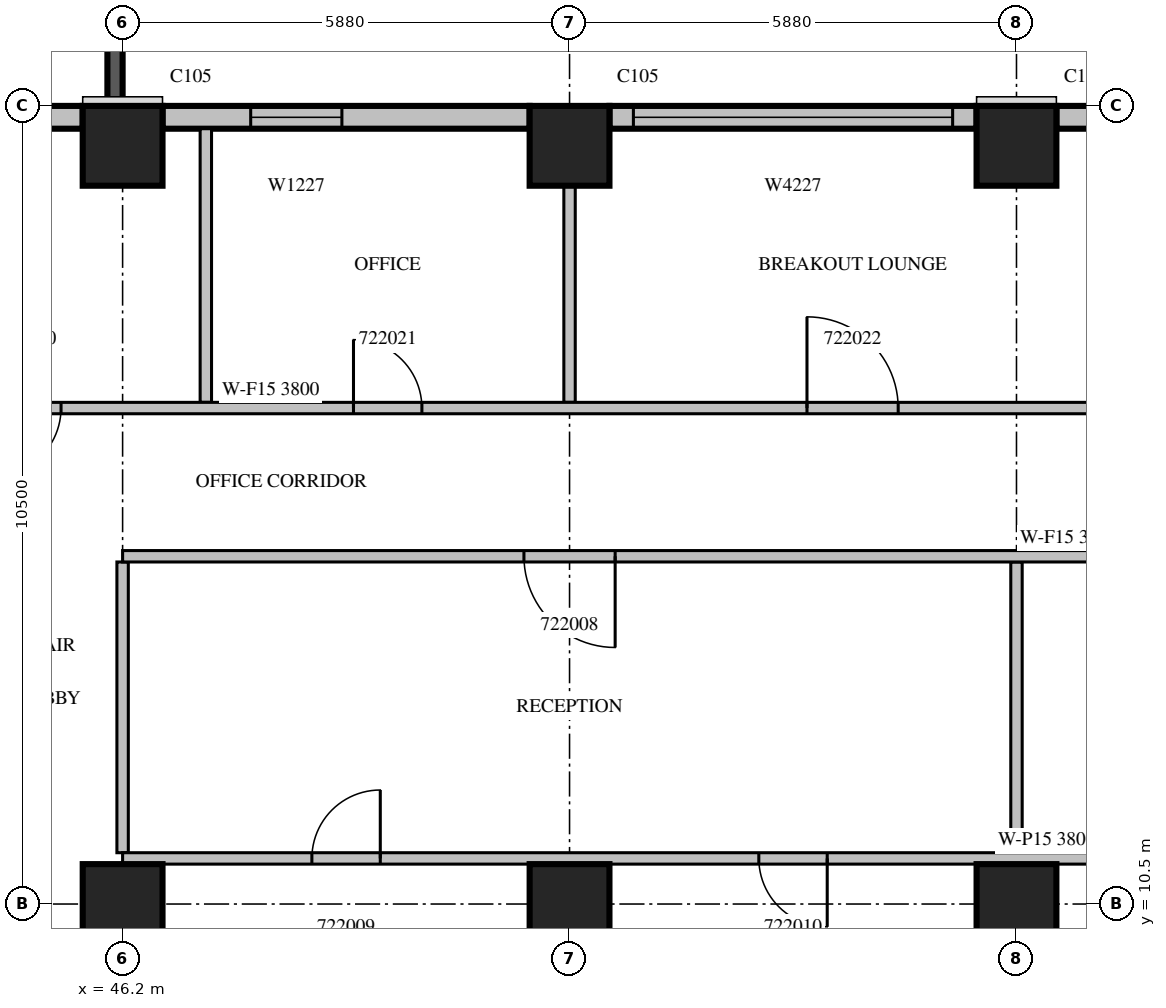
"""IFC4 building model, lengths in metres.
Left out: names, types, materials, properties, quantities, classifications, styles, units other than length and angle.
Written with IfcOpenShell. Run it as: python <this file> out.ifc"""

import sys

from ifc_helpers import new_model, si_unit, direction, frame, frame_2d, origin, origin_2d, place, context, subcontext, project, spatial, rectangle, extrude, source, transform, mapped, element, fill, save


model = new_model("IFC4")
c1 = context("Model", 3, precision=1e-05, world=origin(), true_north=direction((0.0, 1.0)))
c2 = subcontext(c1, "Body", "Model", "MODEL_VIEW")
j1 = project(units=[si_unit("LENGTHUNIT", "METRE"), si_unit("PLANEANGLEUNIT", "RADIAN")], contexts=[c1])
p1 = place(None, origin())
s1 = spatial("IfcSite", under=j1, at=p1, CompositionType="ELEMENT")
p2 = place(p1, origin())
s2 = spatial("IfcBuilding", under=s1, at=p2, CompositionType="ELEMENT")
p3 = place(p2, frame((0.0, 0.0, 103.5)))
s3 = spatial("IfcBuildingStorey", under=s2, at=p3, CompositionType="ELEMENT", Elevation=103.5)
m1 = source(origin(), c2, "Body", "SweptSolid", [
    extrude(rectangle(XDim=1.05, YDim=1.05, at=origin_2d()), origin(), (0.0, 0.0, 1.0), 4.2),
])
for number, where, z_axis, x_axis in (
    (1, (46.2, 10.5, 0.0), (0.0, 0.0, 1.0), (1.0, 0.0, 0.0)),
    (2, (52.08, 10.5, 0.0), (0.0, 0.0, 1.0), (1.0, 0.0, 0.0)),
    (3, (57.96, 10.5, 0.0), (0.0, 0.0, 1.0), (1.0, 0.0, 0.0)),
    (4, (46.2, 20.475, 0.0), (0.0, 0.0, 1.0), (1.0, 0.0, 0.0)),
    (5, (52.08, 20.475, 0.0), (0.0, 0.0, 1.0), (1.0, 0.0, 0.0)),
    (6, (57.96, 20.475, 0.0), (0.0, 0.0, 1.0), (1.0, 0.0, 0.0)),
):
    element("IfcColumn", number, at=place(p3, frame(where, z_axis=z_axis, x_axis=x_axis)), inside=s3, PredefinedType="COLUMN", context=c2, shape_type="MappedRepresentation", body=[
        mapped(m1, transform((0.0, 0.0, 0.0), scale=1.0)),
    ])
m2 = source(origin(), c2, "Body", "SweptSolid", [
    extrude(rectangle(XDim=4.83, YDim=0.3, at=frame_2d((2.415, 0.0))), origin(), (0.0, 0.0, 1.0), 3.8),
])
p4 = place(p3, frame((63.315, 20.85, 0.0), z_axis=(0.0, 0.0, 1.0), x_axis=(-1.0, 0.0, 0.0)))
e7 = element("IfcWall", 7, at=p4, inside=s3, PredefinedType="STANDARD", context=c2, shape_type="MappedRepresentation", body=[
    mapped(m2, transform((0.0, 0.0, 0.0), scale=1.0)),
])
m3 = source(origin(), c2, "Body", "SweptSolid", [
    extrude(rectangle(XDim=1.8, YDim=2.7, at=frame_2d((0.9, 1.35))), frame((0.0, 0.16, 0.0), z_axis=(0.0, -1.0, 0.0), x_axis=(1.0, 0.0, 0.0)), (0.0, 0.0, 1.0), 0.32),
])
p5 = place(p4, frame((1.363, 0.0, 0.6)))
e8 = element("IfcOpeningElement", 8, at=p5, cuts=e7, PredefinedType="OPENING", context=c2, shape_type="MappedRepresentation", body=[
    mapped(m3, transform((0.0, 0.0, 0.0), scale=1.0)),
])
p6 = place(p3, frame((57.435, 20.85, 0.0), z_axis=(0.0, 0.0, 1.0), x_axis=(-1.0, 0.0, 0.0)))
e9 = element("IfcWall", 9, at=p6, inside=s3, PredefinedType="STANDARD", context=c2, shape_type="MappedRepresentation", body=[
    mapped(m2, transform((0.0, 0.0, 0.0), scale=1.0)),
])
p7 = place(p6, frame((0.315, 0.0, 0.6)))
e10 = element("IfcOpeningElement", 10, at=p7, cuts=e9, PredefinedType="OPENING", context=c2, shape_type="SweptSolid", body=[
    extrude(rectangle(XDim=4.2, YDim=2.7, at=frame_2d((2.1, 1.35))), frame((0.0, 0.16, 0.0), z_axis=(0.0, -1.0, 0.0), x_axis=(1.0, 0.0, 0.0)), (0.0, 0.0, 1.0), 0.32),
])
p8 = place(p3, frame((51.555, 20.85, 0.0), z_axis=(0.0, 0.0, 1.0), x_axis=(-1.0, 0.0, 0.0)))
e11 = element("IfcWall", 11, at=p8, inside=s3, PredefinedType="STANDARD", context=c2, shape_type="MappedRepresentation", body=[
    mapped(m2, transform((0.0, 0.0, 0.0), scale=1.0)),
])
m4 = source(origin(), c2, "Body", "SweptSolid", [
    extrude(rectangle(XDim=1.2, YDim=2.7, at=frame_2d((0.6, 1.35))), frame((0.0, 0.16, 0.0), z_axis=(0.0, -1.0, 0.0), x_axis=(1.0, 0.0, 0.0)), (0.0, 0.0, 1.0), 0.32),
])
p9 = place(p8, frame((2.47, 0.0, 0.6)))
e12 = element("IfcOpeningElement", 12, at=p9, cuts=e11, PredefinedType="OPENING", context=c2, shape_type="MappedRepresentation", body=[
    mapped(m4, transform((0.0, 0.0, 0.0), scale=1.0)),
])
m5 = source(origin(), c2, "Body", "SweptSolid", [
    extrude(rectangle(XDim=7.35, YDim=0.3, at=frame_2d((3.675, 0.0))), origin(), (0.0, 0.0, 1.0), 3.8),
])
p10 = place(p3, frame((45.675, 20.85, 0.0), z_axis=(0.0, 0.0, 1.0), x_axis=(-1.0, 0.0, 0.0)))
e13 = element("IfcWall", 13, at=p10, inside=s3, PredefinedType="STANDARD", context=c2, shape_type="MappedRepresentation", body=[
    mapped(m5, transform((0.0, 0.0, 0.0), scale=1.0)),
])
m6 = source(origin(), c2, "Body", "SweptSolid", [
    extrude(rectangle(XDim=1.0, YDim=2.1, at=frame_2d((0.5, 1.05))), frame((0.0, 0.16, 0.0), z_axis=(0.0, -1.0, 0.0), x_axis=(1.0, 0.0, 0.0)), (0.0, 0.0, 1.0), 0.32),
])
p11 = place(p10, frame((1.017, 0.0, 0.0)))
e14 = element("IfcOpeningElement", 14, at=p11, cuts=e13, PredefinedType="OPENING", context=c2, shape_type="MappedRepresentation", body=[
    mapped(m6, transform((0.0, 0.0, 0.0), scale=1.0)),
])
m7 = source(origin(), c2, "Body", "SweptSolid", [
    extrude(rectangle(XDim=3.9, YDim=0.2, at=frame_2d((1.95, 0.0))), origin(), (0.0, 0.0, 1.0), 3.79),
])
p12 = place(p3, frame((46.1, 21.0, 0.0), z_axis=(0.0, 0.0, 1.0), x_axis=(0.0, 1.0, 0.0)))
e15 = element("IfcWall", 15, at=p12, inside=s3, PredefinedType="SOLIDWALL", context=c2, shape_type="MappedRepresentation", body=[
    mapped(m7, transform((0.0, 0.0, 0.0), scale=1.0)),
])
m8 = source(origin(), c2, "Body", "SweptSolid", [
    extrude(rectangle(XDim=2.4, YDim=2.7, at=frame_2d((1.2, 1.35))), frame((0.0, 0.11, 0.0), z_axis=(0.0, -1.0, 0.0), x_axis=(1.0, 0.0, 0.0)), (0.0, 0.0, 1.0), 0.22),
])
p13 = place(p12, frame((0.75, 0.0, 0.6)))
e16 = element("IfcOpeningElement", 16, at=p13, cuts=e15, PredefinedType="OPENING", context=c2, shape_type="MappedRepresentation", body=[
    mapped(m8, transform((0.0, 0.0, 0.0), scale=1.0)),
])
m9 = source(origin(), c2, "Body", "SweptSolid", [
    extrude(rectangle(XDim=3.825, YDim=0.15, at=frame_2d((1.913, 0.0))), origin(), (0.0, 0.0, 1.0), 3.8),
])
for number, where, z_axis, x_axis in (
    (17, (46.2, 11.175, 0.0), (0.0, 0.0, 1.0), (0.0, 1.0, 0.0)),
    (18, (57.96, 11.175, 0.0), (0.0, 0.0, 1.0), (0.0, 1.0, 0.0)),
):
    element("IfcWall", number, at=place(p3, frame(where, z_axis=z_axis, x_axis=x_axis)), inside=s3, PredefinedType="PARTITIONING", context=c2, shape_type="MappedRepresentation", body=[
        mapped(m9, transform((0.0, 0.0, 0.0), scale=1.0)),
    ])
m10 = source(origin(), c2, "Body", "SweptSolid", [
    extrude(rectangle(XDim=24.9, YDim=0.15, at=frame_2d((12.45, 0.0))), origin(), (0.0, 0.0, 1.0), 3.8),
])
p14 = place(p3, frame((71.1, 11.1, 0.0), z_axis=(0.0, 0.0, 1.0), x_axis=(-1.0, 0.0, 0.0)))
e19 = element("IfcWall", 19, at=p14, inside=s3, PredefinedType="PARTITIONING", context=c2, shape_type="MappedRepresentation", body=[
    mapped(m10, transform((0.0, 0.0, 0.0), scale=1.0)),
])
m11 = source(origin(), c2, "Body", "SweptSolid", [
    extrude(rectangle(XDim=0.9, YDim=2.1, at=frame_2d((0.45, 1.05))), frame((0.0, 0.085, 0.0), z_axis=(0.0, -1.0, 0.0), x_axis=(1.0, 0.0, 0.0)), (0.0, 0.0, 1.0), 0.17),
])
p15 = place(p14, frame((21.51, 0.0, 0.0)))
e20 = element("IfcOpeningElement", 20, at=p15, cuts=e19, PredefinedType="OPENING", context=c2, shape_type="MappedRepresentation", body=[
    mapped(m11, transform((0.0, 0.0, 0.0), scale=1.0)),
])
p16 = place(p14, frame((15.63, 0.0, 0.0)))
e21 = element("IfcOpeningElement", 21, at=p16, cuts=e19, PredefinedType="OPENING", context=c2, shape_type="MappedRepresentation", body=[
    mapped(m11, transform((0.0, 0.0, 0.0), scale=1.0)),
])
m12 = source(origin(), c2, "Body", "SweptSolid", [
    extrude(rectangle(XDim=1.1, YDim=2.1, at=frame_2d((0.55, 1.05))), frame((0.0, 0.085, 0.0), z_axis=(0.0, -1.0, 0.0), x_axis=(1.0, 0.0, 0.0)), (0.0, 0.0, 1.0), 0.17),
])
p17 = place(p14, frame((10.692, 0.0, 0.0)))
e22 = element("IfcOpeningElement", 22, at=p17, cuts=e19, PredefinedType="OPENING", context=c2, shape_type="MappedRepresentation", body=[
    mapped(m12, transform((0.0, 0.0, 0.0), scale=1.0)),
])
m13 = source(origin(), c2, "Body", "SweptSolid", [
    extrude(rectangle(XDim=3.6, YDim=0.15, at=frame_2d((1.8, 0.0))), origin(), (0.0, 0.0, 1.0), 3.8),
])
p18 = place(p3, frame((47.295, 20.7, 0.0), z_axis=(0.0, 0.0, 1.0), x_axis=(0.0, -1.0, 0.0)))
e23 = element("IfcWall", 23, at=p18, inside=s3, PredefinedType="PARTITIONING", context=c2, shape_type="MappedRepresentation", body=[
    mapped(m13, transform((0.0, 0.0, 0.0), scale=1.0)),
])
m14 = source(origin(), c2, "Body", "SweptSolid", [
    extrude(rectangle(XDim=2.851, YDim=0.15, at=frame_2d((1.425, 0.0))), origin(), (0.0, 0.0, 1.0), 3.8),
])
p19 = place(p3, frame((52.08, 17.1, 0.0), z_axis=(0.0, 0.0, 1.0), x_axis=(0.0, 1.0, 0.0)))
e24 = element("IfcWall", 24, at=p19, inside=s3, PredefinedType="PARTITIONING", context=c2, shape_type="MappedRepresentation", body=[
    mapped(m14, transform((0.0, 0.0, 0.0), scale=1.0)),
])
p20 = place(p3, frame((71.1, 15.075, 0.0), z_axis=(0.0, 0.0, 1.0), x_axis=(-1.0, 0.0, 0.0)))
e25 = element("IfcWall", 25, at=p20, inside=s3, PredefinedType="PARTITIONING", context=c2, shape_type="MappedRepresentation", body=[
    mapped(m10, transform((0.0, 0.0, 0.0), scale=1.0)),
])
m15 = source(origin(), c2, "Body", "SweptSolid", [
    extrude(rectangle(XDim=1.2, YDim=2.1, at=frame_2d((0.6, 1.05))), frame((0.0, 0.085, 0.0), z_axis=(0.0, -1.0, 0.0), x_axis=(1.0, 0.0, 0.0)), (0.0, 0.0, 1.0), 0.17),
])
p21 = place(p20, frame((18.42, 0.0, 0.0)))
e26 = element("IfcOpeningElement", 26, at=p21, cuts=e25, PredefinedType="OPENING", context=c2, shape_type="MappedRepresentation", body=[
    mapped(m15, transform((0.0, 0.0, 0.0), scale=1.0)),
])
p22 = place(p20, frame((10.967, 0.0, 0.0)))
e27 = element("IfcOpeningElement", 27, at=p22, cuts=e25, PredefinedType="OPENING", context=c2, shape_type="MappedRepresentation", body=[
    mapped(m12, transform((0.0, 0.0, 0.0), scale=1.0)),
])
p23 = place(p20, frame((8.127, 0.0, 0.0)))
e28 = element("IfcOpeningElement", 28, at=p23, cuts=e25, PredefinedType="OPENING", context=c2, shape_type="MappedRepresentation", body=[
    mapped(m11, transform((0.0, 0.0, 0.0), scale=1.0)),
])
p24 = place(p20, frame((4.631, 0.0, 0.0)))
e29 = element("IfcOpeningElement", 29, at=p24, cuts=e25, PredefinedType="OPENING", context=c2, shape_type="MappedRepresentation", body=[
    mapped(m11, transform((0.0, 0.0, 0.0), scale=1.0)),
])
p25 = place(p20, frame((0.964, 0.0, 0.0)))
e30 = element("IfcOpeningElement", 30, at=p25, cuts=e25, PredefinedType="OPENING", context=c2, shape_type="MappedRepresentation", body=[
    mapped(m11, transform((0.0, 0.0, 0.0), scale=1.0)),
])
m16 = source(origin(), c2, "Body", "SweptSolid", [
    extrude(rectangle(XDim=37.5, YDim=0.15, at=frame_2d((18.75, 0.0))), origin(), (0.0, 0.0, 1.0), 3.8),
])
p26 = place(p3, frame((29.4, 17.025, 0.0), z_axis=(0.0, 0.0, 1.0), x_axis=(1.0, 0.0, 0.0)))
e31 = element("IfcWall", 31, at=p26, inside=s3, PredefinedType="PARTITIONING", context=c2, shape_type="MappedRepresentation", body=[
    mapped(m16, transform((0.0, 0.0, 0.0), scale=1.0)),
])
m17 = source(origin(), c2, "Body", "SweptSolid", [
    extrude(rectangle(XDim=1.0, YDim=2.1, at=frame_2d((0.5, 1.05))), frame((0.0, 0.085, 0.0), z_axis=(0.0, -1.0, 0.0), x_axis=(1.0, 0.0, 0.0)), (0.0, 0.0, 1.0), 0.17),
])
p27 = place(p26, frame((1.357, 0.0, 0.0)))
e32 = element("IfcOpeningElement", 32, at=p27, cuts=e31, PredefinedType="OPENING", context=c2, shape_type="MappedRepresentation", body=[
    mapped(m17, transform((0.0, 0.0, 0.0), scale=1.0)),
])
p28 = place(p26, frame((4.669, 0.0, 0.0)))
e33 = element("IfcOpeningElement", 33, at=p28, cuts=e31, PredefinedType="OPENING", context=c2, shape_type="MappedRepresentation", body=[
    mapped(m17, transform((0.0, 0.0, 0.0), scale=1.0)),
])
p29 = place(p26, frame((7.012, 0.0, 0.0)))
e34 = element("IfcOpeningElement", 34, at=p29, cuts=e31, PredefinedType="OPENING", context=c2, shape_type="MappedRepresentation", body=[
    mapped(m17, transform((0.0, 0.0, 0.0), scale=1.0)),
])
p30 = place(p26, frame((10.342, 0.0, 0.0)))
e35 = element("IfcOpeningElement", 35, at=p30, cuts=e31, PredefinedType="OPENING", context=c2, shape_type="MappedRepresentation", body=[
    mapped(m11, transform((0.0, 0.0, 0.0), scale=1.0)),
])
p31 = place(p26, frame((15.09, 0.0, 0.0)))
e36 = element("IfcOpeningElement", 36, at=p31, cuts=e31, PredefinedType="OPENING", context=c2, shape_type="MappedRepresentation", body=[
    mapped(m11, transform((0.0, 0.0, 0.0), scale=1.0)),
])
p32 = place(p26, frame((19.837, 0.0, 0.0)))
e37 = element("IfcOpeningElement", 37, at=p32, cuts=e31, PredefinedType="OPENING", context=c2, shape_type="MappedRepresentation", body=[
    mapped(m11, transform((0.0, 0.0, 0.0), scale=1.0)),
])
p33 = place(p26, frame((25.804, 0.0, 0.0)))
e38 = element("IfcOpeningElement", 38, at=p33, cuts=e31, PredefinedType="OPENING", context=c2, shape_type="MappedRepresentation", body=[
    mapped(m15, transform((0.0, 0.0, 0.0), scale=1.0)),
])
p34 = place(p26, frame((33.251, 0.0, 0.0)))
e39 = element("IfcOpeningElement", 39, at=p34, cuts=e31, PredefinedType="OPENING", context=c2, shape_type="MappedRepresentation", body=[
    mapped(m15, transform((0.0, 0.0, 0.0), scale=1.0)),
])
m18 = source(origin(), c2, "Body", "SweptSolid", [
    extrude(rectangle(XDim=1.2, YDim=2.7, at=frame_2d((0.6, 1.35))), frame((0.0, 0.03, 0.0), z_axis=(0.0, -1.0, 0.0), x_axis=(1.0, 0.0, 0.0)), (0.0, 0.0, 1.0), 0.06),
])
p35 = place(p9, origin())
e40 = element("IfcWindow", 40, at=p35, inside=s3, PartitioningType="SINGLE_PANEL", PredefinedType="WINDOW", context=c2, shape_type="MappedRepresentation", body=[
    mapped(m18, transform((0.0, 0.0, 0.0), scale=1.0)),
])
fill(e12, e40)
p36 = place(p7, origin())
e41 = element("IfcWindow", 41, at=p36, inside=s3, PartitioningType="SINGLE_PANEL", PredefinedType="WINDOW", context=c2, shape_type="SweptSolid", body=[
    extrude(rectangle(XDim=4.2, YDim=2.7, at=frame_2d((2.1, 1.35))), frame((0.0, 0.03, 0.0), z_axis=(0.0, -1.0, 0.0), x_axis=(1.0, 0.0, 0.0)), (0.0, 0.0, 1.0), 0.06),
])
fill(e10, e41)
m19 = source(origin(), c2, "Body", "SweptSolid", [
    extrude(rectangle(XDim=1.2, YDim=2.1, at=frame_2d((0.6, 1.05))), frame((0.0, 0.025, 0.0), z_axis=(0.0, -1.0, 0.0), x_axis=(1.0, 0.0, 0.0)), (0.0, 0.0, 1.0), 0.05),
])
p37 = place(p21, origin())
e42 = element("IfcDoor", 42, at=p37, inside=s3, OperationType="SINGLE_SWING_LEFT", PredefinedType="DOOR", context=c2, shape_type="MappedRepresentation", body=[
    mapped(m19, transform((0.0, 0.0, 0.0), scale=1.0)),
])
fill(e26, e42)
m20 = source(origin(), c2, "Body", "SweptSolid", [
    extrude(rectangle(XDim=0.9, YDim=2.1, at=frame_2d((0.45, 1.05))), frame((0.0, 0.025, 0.0), z_axis=(0.0, -1.0, 0.0), x_axis=(1.0, 0.0, 0.0)), (0.0, 0.0, 1.0), 0.05),
])
p38 = place(p15, origin())
e43 = element("IfcDoor", 43, at=p38, inside=s3, OperationType="SINGLE_SWING_RIGHT", PredefinedType="DOOR", context=c2, shape_type="MappedRepresentation", body=[
    mapped(m20, transform((0.0, 0.0, 0.0), scale=1.0)),
])
fill(e20, e43)
p39 = place(p16, origin())
e44 = element("IfcDoor", 44, at=p39, inside=s3, OperationType="SINGLE_SWING_LEFT", PredefinedType="DOOR", context=c2, shape_type="MappedRepresentation", body=[
    mapped(m20, transform((0.0, 0.0, 0.0), scale=1.0)),
])
fill(e21, e44)
p40 = place(p31, origin())
e45 = element("IfcDoor", 45, at=p40, inside=s3, OperationType="SINGLE_SWING_RIGHT", PredefinedType="DOOR", context=c2, shape_type="MappedRepresentation", body=[
    mapped(m20, transform((0.0, 0.0, 0.0), scale=1.0)),
])
fill(e36, e45)
p41 = place(p32, origin())
e46 = element("IfcDoor", 46, at=p41, inside=s3, OperationType="SINGLE_SWING_LEFT", PredefinedType="DOOR", context=c2, shape_type="MappedRepresentation", body=[
    mapped(m20, transform((0.0, 0.0, 0.0), scale=1.0)),
])
fill(e37, e46)
p42 = place(p33, origin())
e47 = element("IfcDoor", 47, at=p42, inside=s3, OperationType="SINGLE_SWING_LEFT", PredefinedType="DOOR", context=c2, shape_type="MappedRepresentation", body=[
    mapped(m19, transform((0.0, 0.0, 0.0), scale=1.0)),
])
fill(e38, e47)
save(model, sys.argv[1])
